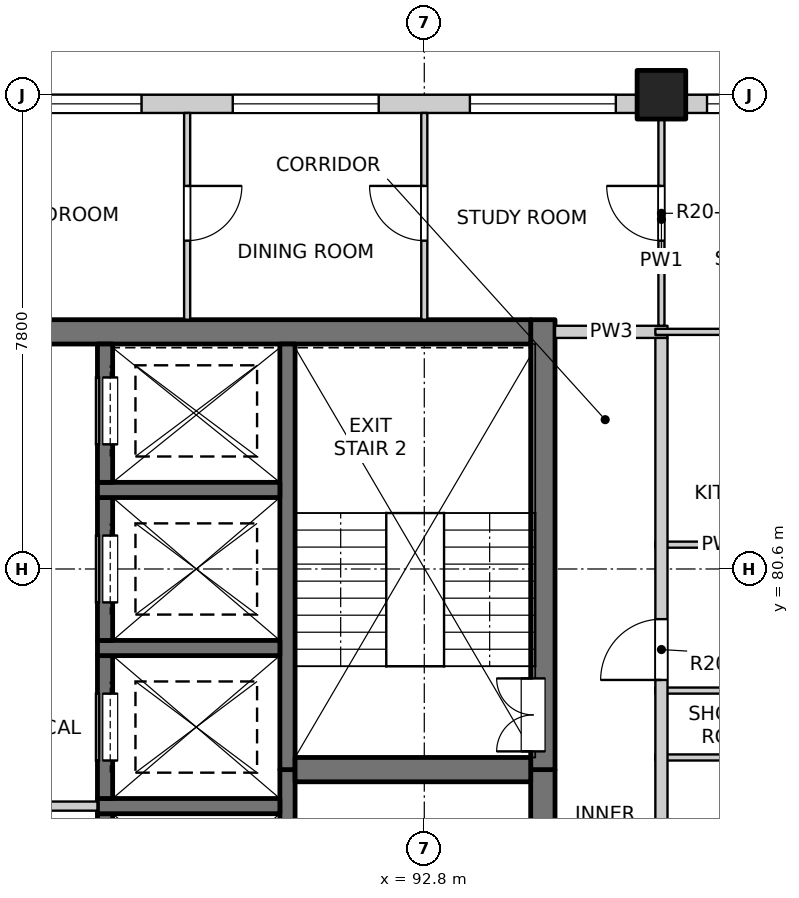
"""IFC4 building model, lengths in metres.
Left out: names, types, materials, properties, quantities, classifications, styles, units other than length and angle.
Written with IfcOpenShell. Run it as: python <this file> out.ifc"""

import sys

from ifc_helpers import new_model, si_unit, direction, frame, frame_2d, origin, origin_2d, place, context, subcontext, project, spatial, rectangle, extrude, element, fill, save


model = new_model("IFC4")
c1 = context("Model", 3, precision=1e-05, world=origin(), true_north=direction((0.0, 1.0)))
c2 = subcontext(c1, "Body", "Model", "MODEL_VIEW")
j1 = project(units=[si_unit("LENGTHUNIT", "METRE"), si_unit("PLANEANGLEUNIT", "RADIAN")], contexts=[c1])
p1 = place(None, origin())
s1 = spatial("IfcSite", under=j1, at=p1, CompositionType="ELEMENT")
p2 = place(p1, origin())
s2 = spatial("IfcBuilding", under=s1, at=p2, CompositionType="ELEMENT")
p3 = place(p2, frame((0.0, 0.0, 204.1)))
s3 = spatial("IfcBuildingStorey", under=s2, at=p3, CompositionType="ELEMENT", Elevation=204.1)
p4 = place(p3, frame((96.7, 88.4, -0.25), z_axis=(0.0, 0.0, 1.0), x_axis=(1.0, 0.0, 0.0)))
e1 = element("IfcColumn", 1, at=p4, inside=s3, PredefinedType="COLUMN", context=c2, shape_type="SweptSolid", body=[
    extrude(rectangle(XDim=0.8, YDim=0.8, at=origin_2d()), origin(), (0.0, 0.0, 1.0), 3.4),
])
p5 = place(p3, frame((94.75, 61.95, -0.25), z_axis=(0.0, 0.0, 1.0), x_axis=(0.0, 1.0, 0.0)))
e2 = element("IfcWall", 2, at=p5, inside=s3, PredefinedType="SOLIDWALL", context=c2, shape_type="SweptSolid", body=[
    extrude(rectangle(XDim=15.35, YDim=0.4, at=frame_2d((7.675, 0.0))), origin(), (0.0, 0.0, 1.0), 3.4),
])
p6 = place(p5, frame((0.925, 0.0, 0.25)))
e3 = element("IfcOpeningElement", 3, at=p6, cuts=e2, PredefinedType="OPENING", context=c2, shape_type="SweptSolid", body=[
    extrude(rectangle(XDim=0.9, YDim=2.1, at=frame_2d((0.45, 1.05))), frame((0.0, 0.21, 0.0), z_axis=(0.0, -1.0, 0.0), x_axis=(1.0, 0.0, 0.0)), (0.0, 0.0, 1.0), 0.42),
])
p7 = place(p5, frame((5.15, 0.0, 0.25)))
e4 = element("IfcOpeningElement", 4, at=p7, cuts=e2, PredefinedType="OPENING", context=c2, shape_type="SweptSolid", body=[
    extrude(rectangle(XDim=0.9, YDim=2.1, at=frame_2d((0.45, 1.05))), frame((0.0, 0.21, 0.0), z_axis=(0.0, -1.0, 0.0), x_axis=(1.0, 0.0, 0.0)), (0.0, 0.0, 1.0), 0.42),
])
p8 = place(p5, frame((9.65, 0.0, 0.25)))
e5 = element("IfcOpeningElement", 5, at=p8, cuts=e2, PredefinedType="OPENING", context=c2, shape_type="SweptSolid", body=[
    extrude(rectangle(XDim=0.9, YDim=2.1, at=frame_2d((0.45, 1.05))), frame((0.0, 0.21, 0.0), z_axis=(0.0, -1.0, 0.0), x_axis=(1.0, 0.0, 0.0)), (0.0, 0.0, 1.0), 0.42),
])
p9 = place(p5, frame((13.1, 0.0, 0.25)))
e6 = element("IfcOpeningElement", 6, at=p9, cuts=e2, PredefinedType="OPENING", context=c2, shape_type="SweptSolid", body=[
    extrude(rectangle(XDim=0.9, YDim=2.1, at=frame_2d((0.45, 1.05))), frame((0.0, 0.21, 0.0), z_axis=(0.0, -1.0, 0.0), x_axis=(1.0, 0.0, 0.0)), (0.0, 0.0, 1.0), 0.42),
])
p10 = place(p3, frame((94.75, 77.3, -0.25), z_axis=(0.0, 0.0, 1.0), x_axis=(0.0, 1.0, 0.0)))
e7 = element("IfcWall", 7, at=p10, inside=s3, PredefinedType="SOLIDWALL", context=c2, shape_type="SweptSolid", body=[
    extrude(rectangle(XDim=7.4, YDim=0.4, at=frame_2d((3.7, 0.0))), origin(), (0.0, 0.0, 1.0), 3.4),
])
p11 = place(p10, frame((0.3, 0.0, 0.25)))
e8 = element("IfcOpeningElement", 8, at=p11, cuts=e7, PredefinedType="OPENING", context=c2, shape_type="SweptSolid", body=[
    extrude(rectangle(XDim=1.2, YDim=2.1, at=frame_2d((0.6, 1.05))), frame((0.0, 0.21, 0.0), z_axis=(0.0, -1.0, 0.0), x_axis=(1.0, 0.0, 0.0)), (0.0, 0.0, 1.0), 0.42),
])
p12 = place(p3, frame((75.45, 84.5, -0.25), z_axis=(0.0, 0.0, 1.0), x_axis=(1.0, 0.0, 0.0)))
e9 = element("IfcWall", 9, at=p12, inside=s3, PredefinedType="SOLIDWALL", context=c2, shape_type="SweptSolid", body=[
    extrude(rectangle(XDim=19.1, YDim=0.4, at=frame_2d((9.55, 0.0))), origin(), (0.0, 0.0, 1.0), 3.4),
])
p13 = place(p3, frame((90.55, 61.95, -0.25), z_axis=(0.0, 0.0, 1.0), x_axis=(0.0, 1.0, 0.0)))
e10 = element("IfcWall", 10, at=p13, inside=s3, PredefinedType="SOLIDWALL", context=c2, shape_type="SweptSolid", body=[
    extrude(rectangle(XDim=15.35, YDim=0.25, at=frame_2d((7.675, 0.0))), origin(), (0.0, 0.0, 1.0), 3.4),
])
p14 = place(p3, frame((90.55, 77.3, -0.25), z_axis=(0.0, 0.0, 1.0), x_axis=(0.0, 1.0, 0.0)))
e11 = element("IfcWall", 11, at=p14, inside=s3, PredefinedType="SOLIDWALL", context=c2, shape_type="SweptSolid", body=[
    extrude(rectangle(XDim=7.0, YDim=0.25, at=frame_2d((3.5, 0.0))), origin(), (0.0, 0.0, 1.0), 3.4),
])
p15 = place(p3, frame((87.55, 74.225, -0.25), z_axis=(0.0, 0.0, 1.0), x_axis=(0.0, 1.0, 0.0)))
e12 = element("IfcWall", 12, at=p15, inside=s3, PredefinedType="SOLIDWALL", context=c2, shape_type="SweptSolid", body=[
    extrude(rectangle(XDim=2.35, YDim=0.25, at=frame_2d((1.175, 0.0))), origin(), (0.0, 0.0, 1.0), 3.4),
])
p16 = place(p15, frame((0.625, 0.0, 0.25)))
e13 = element("IfcOpeningElement", 13, at=p16, cuts=e12, PredefinedType="OPENING", context=c2, shape_type="SweptSolid", body=[
    extrude(rectangle(XDim=1.1, YDim=2.1, at=frame_2d((0.55, 1.05))), frame((0.0, 0.135, 0.0), z_axis=(0.0, -1.0, 0.0), x_axis=(1.0, 0.0, 0.0)), (0.0, 0.0, 1.0), 0.27),
])
p17 = place(p3, frame((87.425, 76.7, -0.25), z_axis=(0.0, 0.0, 1.0), x_axis=(1.0, 0.0, 0.0)))
e14 = element("IfcWall", 14, at=p17, inside=s3, PredefinedType="SOLIDWALL", context=c2, shape_type="SweptSolid", body=[
    extrude(rectangle(XDim=3.0, YDim=0.25, at=frame_2d((1.5, 0.0))), origin(), (0.0, 0.0, 1.0), 3.4),
])
p18 = place(p3, frame((87.55, 76.825, -0.25), z_axis=(0.0, 0.0, 1.0), x_axis=(0.0, 1.0, 0.0)))
e15 = element("IfcWall", 15, at=p18, inside=s3, PredefinedType="SOLIDWALL", context=c2, shape_type="SweptSolid", body=[
    extrude(rectangle(XDim=2.35, YDim=0.25, at=frame_2d((1.175, 0.0))), origin(), (0.0, 0.0, 1.0), 3.4),
])
p19 = place(p18, frame((0.625, 0.0, 0.25)))
e16 = element("IfcOpeningElement", 16, at=p19, cuts=e15, PredefinedType="OPENING", context=c2, shape_type="SweptSolid", body=[
    extrude(rectangle(XDim=1.1, YDim=2.1, at=frame_2d((0.55, 1.05))), frame((0.0, 0.135, 0.0), z_axis=(0.0, -1.0, 0.0), x_axis=(1.0, 0.0, 0.0)), (0.0, 0.0, 1.0), 0.27),
])
p20 = place(p3, frame((87.425, 79.3, -0.25), z_axis=(0.0, 0.0, 1.0), x_axis=(1.0, 0.0, 0.0)))
e17 = element("IfcWall", 17, at=p20, inside=s3, PredefinedType="SOLIDWALL", context=c2, shape_type="SweptSolid", body=[
    extrude(rectangle(XDim=3.0, YDim=0.25, at=frame_2d((1.5, 0.0))), origin(), (0.0, 0.0, 1.0), 3.4),
])
p21 = place(p3, frame((87.55, 79.425, -0.25), z_axis=(0.0, 0.0, 1.0), x_axis=(0.0, 1.0, 0.0)))
e18 = element("IfcWall", 18, at=p21, inside=s3, PredefinedType="SOLIDWALL", context=c2, shape_type="SweptSolid", body=[
    extrude(rectangle(XDim=2.35, YDim=0.25, at=frame_2d((1.175, 0.0))), origin(), (0.0, 0.0, 1.0), 3.4),
])
p22 = place(p21, frame((0.625, 0.0, 0.25)))
e19 = element("IfcOpeningElement", 19, at=p22, cuts=e18, PredefinedType="OPENING", context=c2, shape_type="SweptSolid", body=[
    extrude(rectangle(XDim=1.1, YDim=2.1, at=frame_2d((0.55, 1.05))), frame((0.0, 0.135, 0.0), z_axis=(0.0, -1.0, 0.0), x_axis=(1.0, 0.0, 0.0)), (0.0, 0.0, 1.0), 0.27),
])
p23 = place(p3, frame((87.425, 81.9, -0.25), z_axis=(0.0, 0.0, 1.0), x_axis=(1.0, 0.0, 0.0)))
e20 = element("IfcWall", 20, at=p23, inside=s3, PredefinedType="SOLIDWALL", context=c2, shape_type="SweptSolid", body=[
    extrude(rectangle(XDim=3.0, YDim=0.25, at=frame_2d((1.5, 0.0))), origin(), (0.0, 0.0, 1.0), 3.4),
])
p24 = place(p3, frame((87.55, 82.025, -0.25), z_axis=(0.0, 0.0, 1.0), x_axis=(0.0, 1.0, 0.0)))
e21 = element("IfcWall", 21, at=p24, inside=s3, PredefinedType="SOLIDWALL", context=c2, shape_type="SweptSolid", body=[
    extrude(rectangle(XDim=2.275, YDim=0.25, at=frame_2d((1.138, 0.0))), origin(), (0.0, 0.0, 1.0), 3.4),
])
p25 = place(p24, frame((0.625, 0.0, 0.25)))
e22 = element("IfcOpeningElement", 22, at=p25, cuts=e21, PredefinedType="OPENING", context=c2, shape_type="SweptSolid", body=[
    extrude(rectangle(XDim=1.1, YDim=2.1, at=frame_2d((0.55, 1.05))), frame((0.0, 0.135, 0.0), z_axis=(0.0, -1.0, 0.0), x_axis=(1.0, 0.0, 0.0)), (0.0, 0.0, 1.0), 0.27),
])
p26 = place(p3, frame((90.675, 77.3, -0.25), z_axis=(0.0, 0.0, 1.0), x_axis=(1.0, 0.0, 0.0)))
e23 = element("IfcWall", 23, at=p26, inside=s3, PredefinedType="SOLIDWALL", context=c2, shape_type="SweptSolid", body=[
    extrude(rectangle(XDim=3.875, YDim=0.4, at=frame_2d((1.938, 0.0))), origin(), (0.0, 0.0, 1.0), 3.4),
])
p27 = place(p3, frame((73.7, 88.25, 0.0), z_axis=(0.0, 0.0, 1.0), x_axis=(1.0, 0.0, 0.0)))
e24 = element("IfcWall", 24, at=p27, inside=s3, PredefinedType="SOLIDWALL", context=c2, shape_type="SweptSolid", body=[
    extrude(rectangle(XDim=22.6, YDim=0.3, at=frame_2d((11.3, 0.0))), origin(), (0.0, 0.0, 1.0), 2.7),
])
p28 = place(p27, frame((0.35, 0.0, 0.9)))
e25 = element("IfcOpeningElement", 25, at=p28, cuts=e24, PredefinedType="OPENING", context=c2, shape_type="SweptSolid", body=[
    extrude(rectangle(XDim=2.4, YDim=1.8, at=frame_2d((1.2, 0.9))), frame((0.0, 0.16, 0.0), z_axis=(0.0, -1.0, 0.0), x_axis=(1.0, 0.0, 0.0)), (0.0, 0.0, 1.0), 0.32),
])
p29 = place(p27, frame((4.25, 0.0, 0.9)))
e26 = element("IfcOpeningElement", 26, at=p29, cuts=e24, PredefinedType="OPENING", context=c2, shape_type="SweptSolid", body=[
    extrude(rectangle(XDim=2.4, YDim=1.8, at=frame_2d((1.2, 0.9))), frame((0.0, 0.16, 0.0), z_axis=(0.0, -1.0, 0.0), x_axis=(1.0, 0.0, 0.0)), (0.0, 0.0, 1.0), 0.32),
])
p30 = place(p27, frame((8.15, 0.0, 0.9)))
e27 = element("IfcOpeningElement", 27, at=p30, cuts=e24, PredefinedType="OPENING", context=c2, shape_type="SweptSolid", body=[
    extrude(rectangle(XDim=2.4, YDim=1.8, at=frame_2d((1.2, 0.9))), frame((0.0, 0.16, 0.0), z_axis=(0.0, -1.0, 0.0), x_axis=(1.0, 0.0, 0.0)), (0.0, 0.0, 1.0), 0.32),
])
p31 = place(p27, frame((12.05, 0.0, 0.9)))
e28 = element("IfcOpeningElement", 28, at=p31, cuts=e24, PredefinedType="OPENING", context=c2, shape_type="SweptSolid", body=[
    extrude(rectangle(XDim=2.4, YDim=1.8, at=frame_2d((1.2, 0.9))), frame((0.0, 0.16, 0.0), z_axis=(0.0, -1.0, 0.0), x_axis=(1.0, 0.0, 0.0)), (0.0, 0.0, 1.0), 0.32),
])
p32 = place(p27, frame((15.95, 0.0, 0.9)))
e29 = element("IfcOpeningElement", 29, at=p32, cuts=e24, PredefinedType="OPENING", context=c2, shape_type="SweptSolid", body=[
    extrude(rectangle(XDim=2.4, YDim=1.8, at=frame_2d((1.2, 0.9))), frame((0.0, 0.16, 0.0), z_axis=(0.0, -1.0, 0.0), x_axis=(1.0, 0.0, 0.0)), (0.0, 0.0, 1.0), 0.32),
])
p33 = place(p27, frame((19.85, 0.0, 0.9)))
e30 = element("IfcOpeningElement", 30, at=p33, cuts=e24, PredefinedType="OPENING", context=c2, shape_type="SweptSolid", body=[
    extrude(rectangle(XDim=2.4, YDim=1.8, at=frame_2d((1.2, 0.9))), frame((0.0, 0.16, 0.0), z_axis=(0.0, -1.0, 0.0), x_axis=(1.0, 0.0, 0.0)), (0.0, 0.0, 1.0), 0.32),
])
p34 = place(p3, frame((97.1, 88.25, 0.0), z_axis=(0.0, 0.0, 1.0), x_axis=(1.0, 0.0, 0.0)))
e31 = element("IfcWall", 31, at=p34, inside=s3, PredefinedType="SOLIDWALL", context=c2, shape_type="SweptSolid", body=[
    extrude(rectangle(XDim=7.4, YDim=0.3, at=frame_2d((3.7, 0.0))), origin(), (0.0, 0.0, 1.0), 2.7),
])
p35 = place(p34, frame((0.35, 0.0, 0.9)))
e32 = element("IfcOpeningElement", 32, at=p35, cuts=e31, PredefinedType="OPENING", context=c2, shape_type="SweptSolid", body=[
    extrude(rectangle(XDim=2.4, YDim=1.8, at=frame_2d((1.2, 0.9))), frame((0.0, 0.16, 0.0), z_axis=(0.0, -1.0, 0.0), x_axis=(1.0, 0.0, 0.0)), (0.0, 0.0, 1.0), 0.32),
])
p36 = place(p34, frame((4.25, 0.0, 0.9)))
e33 = element("IfcOpeningElement", 33, at=p36, cuts=e31, PredefinedType="OPENING", context=c2, shape_type="SweptSolid", body=[
    extrude(rectangle(XDim=2.4, YDim=1.8, at=frame_2d((1.2, 0.9))), frame((0.0, 0.16, 0.0), z_axis=(0.0, -1.0, 0.0), x_axis=(1.0, 0.0, 0.0)), (0.0, 0.0, 1.0), 0.32),
])
p37 = place(p3, frame((82.575, 76.7, 0.0), z_axis=(0.0, 0.0, 1.0), x_axis=(1.0, 0.0, 0.0)))
e34 = element("IfcWall", 34, at=p37, inside=s3, PredefinedType="PARTITIONING", context=c2, shape_type="SweptSolid", body=[
    extrude(rectangle(XDim=4.85, YDim=0.15, at=frame_2d((2.425, 0.0))), origin(), (0.0, 0.0, 1.0), 3.15),
])
p38 = place(p37, frame((1.525, 0.0, 0.0)))
e35 = element("IfcOpeningElement", 35, at=p38, cuts=e34, PredefinedType="OPENING", context=c2, shape_type="SweptSolid", body=[
    extrude(rectangle(XDim=1.8, YDim=2.1, at=frame_2d((0.9, 1.05))), frame((0.0, 0.085, 0.0), z_axis=(0.0, -1.0, 0.0), x_axis=(1.0, 0.0, 0.0)), (0.0, 0.0, 1.0), 0.17),
])
for number, where, z_axis, x_axis in (
    (36, (96.6, 77.5, 0.0), (0.0, 0.0, 1.0), (1.0, 0.0, 0.0)),
    (37, (96.6, 78.6, 0.0), (0.0, 0.0, 1.0), (1.0, 0.0, 0.0)),
    (38, (96.6, 81.0, 0.0), (0.0, 0.0, 1.0), (1.0, 0.0, 0.0)),
):
    element("IfcWall", number, at=place(p3, frame(where, z_axis=z_axis, x_axis=x_axis)), inside=s3, PredefinedType="PARTITIONING", context=c2, shape_type="SweptSolid", body=[
        extrude(rectangle(XDim=2.22, YDim=0.1, at=frame_2d((1.11, 0.0))), origin(), (0.0, 0.0, 1.0), 3.15),
    ])
p39 = place(p3, frame((94.95, 84.5, 0.0), z_axis=(0.0, 0.0, 1.0), x_axis=(1.0, 0.0, 0.0)))
e39 = element("IfcWall", 39, at=p39, inside=s3, PredefinedType="PARTITIONING", context=c2, shape_type="SweptSolid", body=[
    extrude(rectangle(XDim=1.85, YDim=0.2, at=frame_2d((0.925, 0.0))), origin(), (0.0, 0.0, 1.0), 3.15),
])
p40 = place(p3, frame((96.6, 84.5, 0.0), z_axis=(0.0, 0.0, 1.0), x_axis=(1.0, 0.0, 0.0)))
e40 = element("IfcWall", 40, at=p40, inside=s3, PredefinedType="PARTITIONING", context=c2, shape_type="SweptSolid", body=[
    extrude(rectangle(XDim=11.5, YDim=0.1, at=frame_2d((5.75, 0.0))), origin(), (0.0, 0.0, 1.0), 3.15),
])
p41 = place(p40, frame((2.635, 0.0, 0.0)))
e41 = element("IfcOpeningElement", 41, at=p41, cuts=e40, PredefinedType="OPENING", context=c2, shape_type="SweptSolid", body=[
    extrude(rectangle(XDim=0.9, YDim=2.1, at=frame_2d((0.45, 1.05))), frame((0.0, 0.06, 0.0), z_axis=(0.0, -1.0, 0.0), x_axis=(1.0, 0.0, 0.0)), (0.0, 0.0, 1.0), 0.12),
])
p42 = place(p3, frame((88.9, 84.7, 0.0), z_axis=(0.0, 0.0, 1.0), x_axis=(0.0, 1.0, 0.0)))
e42 = element("IfcWall", 42, at=p42, inside=s3, PredefinedType="PARTITIONING", context=c2, shape_type="SweptSolid", body=[
    extrude(rectangle(XDim=3.4, YDim=0.1, at=frame_2d((1.7, 0.0))), origin(), (0.0, 0.0, 1.0), 3.15),
])
p43 = place(p42, frame((1.3, 0.0, 0.0)))
e43 = element("IfcOpeningElement", 43, at=p43, cuts=e42, PredefinedType="OPENING", context=c2, shape_type="SweptSolid", body=[
    extrude(rectangle(XDim=0.9, YDim=2.1, at=frame_2d((0.45, 1.05))), frame((0.0, 0.06, 0.0), z_axis=(0.0, -1.0, 0.0), x_axis=(1.0, 0.0, 0.0)), (0.0, 0.0, 1.0), 0.12),
])
p44 = place(p3, frame((92.8, 84.7, 0.0), z_axis=(0.0, 0.0, 1.0), x_axis=(0.0, 1.0, 0.0)))
e44 = element("IfcWall", 44, at=p44, inside=s3, PredefinedType="PARTITIONING", context=c2, shape_type="SweptSolid", body=[
    extrude(rectangle(XDim=3.4, YDim=0.1, at=frame_2d((1.7, 0.0))), origin(), (0.0, 0.0, 1.0), 3.15),
])
p45 = place(p44, frame((1.3, 0.0, 0.0)))
e45 = element("IfcOpeningElement", 45, at=p45, cuts=e44, PredefinedType="OPENING", context=c2, shape_type="SweptSolid", body=[
    extrude(rectangle(XDim=0.9, YDim=2.1, at=frame_2d((0.45, 1.05))), frame((0.0, 0.06, 0.0), z_axis=(0.0, -1.0, 0.0), x_axis=(1.0, 0.0, 0.0)), (0.0, 0.0, 1.0), 0.12),
])
p46 = place(p3, frame((96.7, 49.5, 0.0), z_axis=(0.0, 0.0, 1.0), x_axis=(0.0, 1.0, 0.0)))
e46 = element("IfcWall", 46, at=p46, inside=s3, PredefinedType="PARTITIONING", context=c2, shape_type="SweptSolid", body=[
    extrude(rectangle(XDim=34.9, YDim=0.2, at=frame_2d((17.45, 0.0))), origin(), (0.0, 0.0, 1.0), 3.15),
])
p47 = place(p46, frame((9.625, 0.0, 0.0)))
e47 = element("IfcOpeningElement", 47, at=p47, cuts=e46, PredefinedType="OPENING", context=c2, shape_type="SweptSolid", body=[
    extrude(rectangle(XDim=1.0, YDim=2.1, at=frame_2d((0.5, 1.05))), frame((0.0, 0.11, 0.0), z_axis=(0.0, -1.0, 0.0), x_axis=(1.0, 0.0, 0.0)), (0.0, 0.0, 1.0), 0.22),
])
p48 = place(p46, frame((14.125, 0.0, 0.0)))
e48 = element("IfcOpeningElement", 48, at=p48, cuts=e46, PredefinedType="OPENING", context=c2, shape_type="SweptSolid", body=[
    extrude(rectangle(XDim=1.0, YDim=2.1, at=frame_2d((0.5, 1.05))), frame((0.0, 0.11, 0.0), z_axis=(0.0, -1.0, 0.0), x_axis=(1.0, 0.0, 0.0)), (0.0, 0.0, 1.0), 0.22),
])
p49 = place(p46, frame((29.275, 0.0, 0.0)))
e49 = element("IfcOpeningElement", 49, at=p49, cuts=e46, PredefinedType="OPENING", context=c2, shape_type="SweptSolid", body=[
    extrude(rectangle(XDim=1.0, YDim=2.1, at=frame_2d((0.5, 1.05))), frame((0.0, 0.11, 0.0), z_axis=(0.0, -1.0, 0.0), x_axis=(1.0, 0.0, 0.0)), (0.0, 0.0, 1.0), 0.22),
])
p50 = place(p3, frame((96.7, 84.6, 0.0), z_axis=(0.0, 0.0, 1.0), x_axis=(0.0, 1.0, 0.0)))
e50 = element("IfcWall", 50, at=p50, inside=s3, PredefinedType="PARTITIONING", context=c2, shape_type="SweptSolid", body=[
    extrude(rectangle(XDim=3.5, YDim=0.1, at=frame_2d((1.75, 0.0))), origin(), (0.0, 0.0, 1.0), 3.15),
])
p51 = place(p50, frame((1.4, 0.0, 0.0)))
e51 = element("IfcOpeningElement", 51, at=p51, cuts=e50, PredefinedType="OPENING", context=c2, shape_type="SweptSolid", body=[
    extrude(rectangle(XDim=0.9, YDim=2.1, at=frame_2d((0.45, 1.05))), frame((0.0, 0.06, 0.0), z_axis=(0.0, -1.0, 0.0), x_axis=(1.0, 0.0, 0.0)), (0.0, 0.0, 1.0), 0.12),
])
p52 = place(p31, origin())
e52 = element("IfcWindow", 52, at=p52, inside=s3, PartitioningType="DOUBLE_PANEL_VERTICAL", PredefinedType="WINDOW", context=c2, shape_type="SweptSolid", body=[
    extrude(rectangle(XDim=2.4, YDim=1.8, at=frame_2d((1.2, 0.9))), frame((0.0, 0.03, 0.0), z_axis=(0.0, -1.0, 0.0), x_axis=(1.0, 0.0, 0.0)), (0.0, 0.0, 1.0), 0.06),
])
fill(e28, e52)
p53 = place(p32, origin())
e53 = element("IfcWindow", 53, at=p53, inside=s3, PartitioningType="DOUBLE_PANEL_VERTICAL", PredefinedType="WINDOW", context=c2, shape_type="SweptSolid", body=[
    extrude(rectangle(XDim=2.4, YDim=1.8, at=frame_2d((1.2, 0.9))), frame((0.0, 0.03, 0.0), z_axis=(0.0, -1.0, 0.0), x_axis=(1.0, 0.0, 0.0)), (0.0, 0.0, 1.0), 0.06),
])
fill(e29, e53)
p54 = place(p33, origin())
e54 = element("IfcWindow", 54, at=p54, inside=s3, PartitioningType="DOUBLE_PANEL_VERTICAL", PredefinedType="WINDOW", context=c2, shape_type="SweptSolid", body=[
    extrude(rectangle(XDim=2.4, YDim=1.8, at=frame_2d((1.2, 0.9))), frame((0.0, 0.03, 0.0), z_axis=(0.0, -1.0, 0.0), x_axis=(1.0, 0.0, 0.0)), (0.0, 0.0, 1.0), 0.06),
])
fill(e30, e54)
p55 = place(p35, origin())
e55 = element("IfcWindow", 55, at=p55, inside=s3, PartitioningType="DOUBLE_PANEL_VERTICAL", PredefinedType="WINDOW", context=c2, shape_type="SweptSolid", body=[
    extrude(rectangle(XDim=2.4, YDim=1.8, at=frame_2d((1.2, 0.9))), frame((0.0, 0.03, 0.0), z_axis=(0.0, -1.0, 0.0), x_axis=(1.0, 0.0, 0.0)), (0.0, 0.0, 1.0), 0.06),
])
fill(e32, e55)
p56 = place(p19, origin())
e56 = element("IfcDoor", 56, at=p56, inside=s3, OperationType="SLIDING_TO_LEFT", PredefinedType="DOOR", context=c2, shape_type="SweptSolid", body=[
    extrude(rectangle(XDim=1.1, YDim=2.1, at=frame_2d((0.55, 1.05))), frame((0.0, -0.06, 0.0), z_axis=(0.0, -1.0, 0.0), x_axis=(1.0, 0.0, 0.0)), (0.0, 0.0, 1.0), 0.05),
])
fill(e16, e56)
p57 = place(p11, origin())
e57 = element("IfcDoor", 57, at=p57, inside=s3, OperationType="DOUBLE_DOOR_SINGLE_SWING", PredefinedType="DOOR", context=c2, shape_type="SweptSolid", body=[
    extrude(rectangle(XDim=1.2, YDim=2.1, at=frame_2d((0.6, 1.05))), frame((0.0, 0.185, 0.0), z_axis=(0.0, -1.0, 0.0), x_axis=(1.0, 0.0, 0.0)), (0.0, 0.0, 1.0), 0.05),
])
fill(e8, e57)
p58 = place(p49, origin())
e58 = element("IfcDoor", 58, at=p58, inside=s3, OperationType="SINGLE_SWING_LEFT", PredefinedType="DOOR", context=c2, shape_type="SweptSolid", body=[
    extrude(rectangle(XDim=1.0, YDim=2.1, at=frame_2d((0.5, 1.05))), frame((0.0, 0.025, 0.0), z_axis=(0.0, -1.0, 0.0), x_axis=(1.0, 0.0, 0.0)), (0.0, 0.0, 1.0), 0.05),
])
fill(e49, e58)
p59 = place(p22, origin())
e59 = element("IfcDoor", 59, at=p59, inside=s3, OperationType="SLIDING_TO_RIGHT", PredefinedType="DOOR", context=c2, shape_type="SweptSolid", body=[
    extrude(rectangle(XDim=1.1, YDim=2.1, at=frame_2d((0.55, 1.05))), frame((0.0, -0.06, 0.0), z_axis=(0.0, -1.0, 0.0), x_axis=(1.0, 0.0, 0.0)), (0.0, 0.0, 1.0), 0.05),
])
fill(e19, e59)
p60 = place(p25, origin())
e60 = element("IfcDoor", 60, at=p60, inside=s3, OperationType="SLIDING_TO_RIGHT", PredefinedType="DOOR", context=c2, shape_type="SweptSolid", body=[
    extrude(rectangle(XDim=1.1, YDim=2.1, at=frame_2d((0.55, 1.05))), frame((0.0, -0.06, 0.0), z_axis=(0.0, -1.0, 0.0), x_axis=(1.0, 0.0, 0.0)), (0.0, 0.0, 1.0), 0.05),
])
fill(e22, e60)
p61 = place(p43, origin())
e61 = element("IfcDoor", 61, at=p61, inside=s3, OperationType="SINGLE_SWING_LEFT", PredefinedType="DOOR", context=c2, shape_type="SweptSolid", body=[
    extrude(rectangle(XDim=0.9, YDim=2.1, at=frame_2d((0.45, 1.05))), frame((0.0, 0.025, 0.0), z_axis=(0.0, -1.0, 0.0), x_axis=(1.0, 0.0, 0.0)), (0.0, 0.0, 1.0), 0.05),
])
fill(e43, e61)
p62 = place(p45, origin())
e62 = element("IfcDoor", 62, at=p62, inside=s3, OperationType="SINGLE_SWING_RIGHT", PredefinedType="DOOR", context=c2, shape_type="SweptSolid", body=[
    extrude(rectangle(XDim=0.9, YDim=2.1, at=frame_2d((0.45, 1.05))), frame((0.0, 0.025, 0.0), z_axis=(0.0, -1.0, 0.0), x_axis=(1.0, 0.0, 0.0)), (0.0, 0.0, 1.0), 0.05),
])
fill(e45, e62)
p63 = place(p51, origin())
e63 = element("IfcDoor", 63, at=p63, inside=s3, OperationType="SINGLE_SWING_RIGHT", PredefinedType="DOOR", context=c2, shape_type="SweptSolid", body=[
    extrude(rectangle(XDim=0.9, YDim=2.1, at=frame_2d((0.45, 1.05))), frame((0.0, 0.025, 0.0), z_axis=(0.0, -1.0, 0.0), x_axis=(1.0, 0.0, 0.0)), (0.0, 0.0, 1.0), 0.05),
])
fill(e51, e63)
save(model, sys.argv[1])
